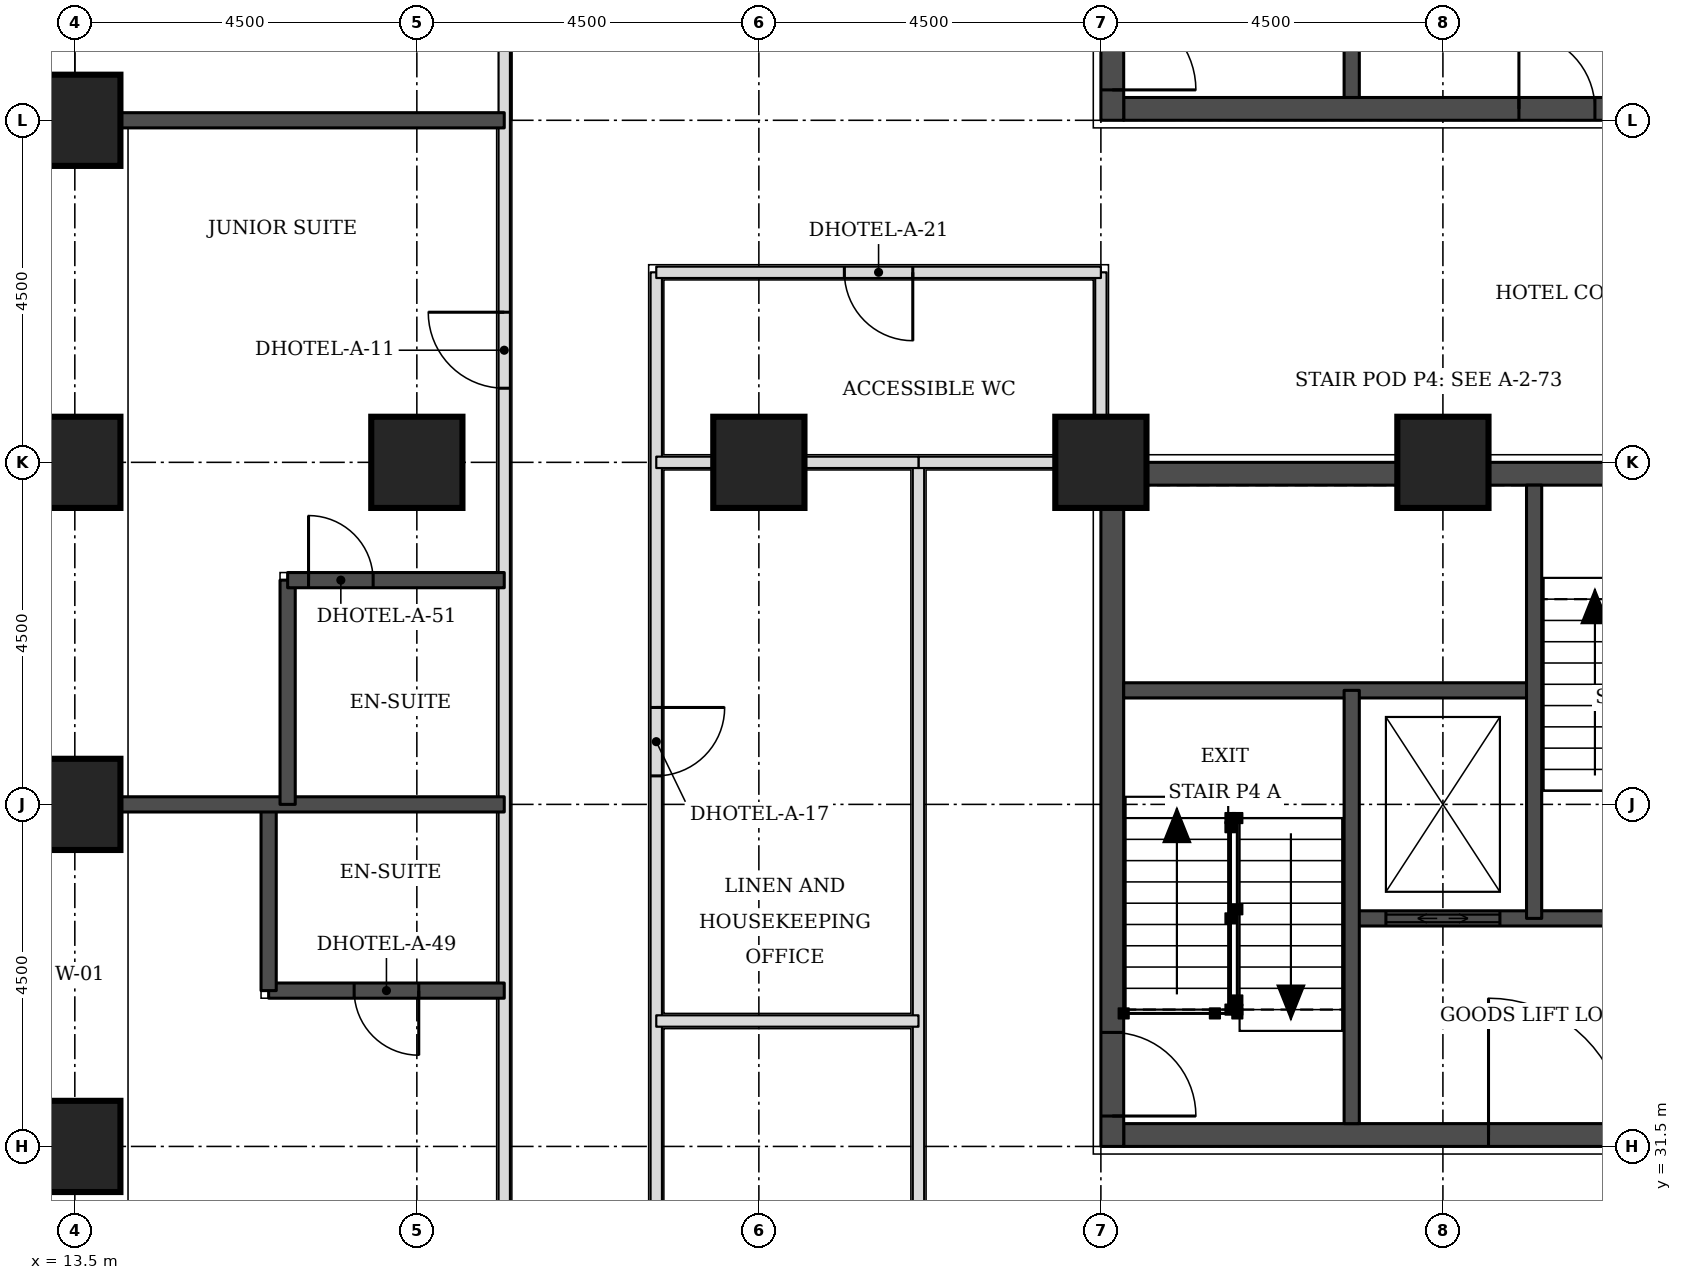
"""IFC4 building model, lengths in metres.
Left out: names, types, materials, properties, quantities, classifications, styles, units other than length and angle.
Written with IfcOpenShell. Run it as: python <this file> out.ifc"""

import sys

from ifc_helpers import new_model, si_unit, direction, frame, frame_2d, origin, origin_2d, place, context, subcontext, project, spatial, rectangle, extrude, element, fill, save


model = new_model("IFC4")
c1 = context("Model", 3, precision=1e-05, world=origin(), true_north=direction((0.0, 1.0)))
c2 = subcontext(c1, "Body", "Model", "MODEL_VIEW")
j1 = project(units=[si_unit("LENGTHUNIT", "METRE"), si_unit("PLANEANGLEUNIT", "RADIAN")], contexts=[c1])
p1 = place(None, origin())
s1 = spatial("IfcSite", under=j1, at=p1, CompositionType="ELEMENT")
p2 = place(p1, origin())
s2 = spatial("IfcBuilding", under=s1, at=p2, CompositionType="ELEMENT")
p3 = place(p2, frame((0.0, 0.0, 26.4)))
s3 = spatial("IfcBuildingStorey", under=s2, at=p3, CompositionType="ELEMENT", Elevation=26.4)
for number, where, z_axis, x_axis in (
    (1, (13.5, 31.5, 0.0), (0.0, 0.0, 1.0), (1.0, 0.0, 0.0)),
    (2, (13.5, 36.0, 0.0), (0.0, 0.0, 1.0), (1.0, 0.0, 0.0)),
    (3, (13.5, 40.5, 0.0), (0.0, 0.0, 1.0), (1.0, 0.0, 0.0)),
    (4, (18.0, 40.5, 0.0), (0.0, 0.0, 1.0), (1.0, 0.0, 0.0)),
    (5, (22.5, 40.5, 0.0), (0.0, 0.0, 1.0), (1.0, 0.0, 0.0)),
    (6, (27.0, 40.5, 0.0), (0.0, 0.0, 1.0), (1.0, 0.0, 0.0)),
    (7, (31.5, 40.5, 0.0), (0.0, 0.0, 1.0), (1.0, 0.0, 0.0)),
    (8, (13.5, 45.0, 0.0), (0.0, 0.0, 1.0), (1.0, 0.0, 0.0)),
):
    element("IfcColumn", number, at=place(p3, frame(where, z_axis=z_axis, x_axis=x_axis)), inside=s3, PredefinedType="COLUMN", context=c2, shape_type="SweptSolid", body=[
        extrude(rectangle(XDim=1.2, YDim=1.2, at=origin_2d()), origin(), (0.0, 0.0, 1.0), 3.3),
    ])
p4 = place(p3, frame((27.3, 45.15, 0.0), z_axis=(0.0, 0.0, 1.0), x_axis=(1.0, 0.0, 0.0)))
e9 = element("IfcWall", 9, at=p4, inside=s3, PredefinedType="SHEAR", context=c2, shape_type="SweptSolid", body=[
    extrude(rectangle(XDim=8.4, YDim=0.3, at=frame_2d((4.2, 0.0))), origin(), (0.0, 0.0, 1.0), 3.3),
])
p5 = place(p4, frame((5.2, 0.0, 0.0)))
e10 = element("IfcOpeningElement", 10, at=p5, cuts=e9, PredefinedType="OPENING", context=c2, shape_type="SweptSolid", body=[
    extrude(rectangle(XDim=1.0, YDim=2.1, at=frame_2d((0.5, 1.05))), frame((0.0, 0.16, 0.0), z_axis=(0.0, -1.0, 0.0), x_axis=(1.0, 0.0, 0.0)), (0.0, 0.0, 1.0), 0.32),
])
p6 = place(p3, frame((27.15, 45.0, 0.0), z_axis=(0.0, 0.0, 1.0), x_axis=(0.0, 1.0, 0.0)))
e11 = element("IfcWall", 11, at=p6, inside=s3, PredefinedType="SHEAR", context=c2, shape_type="SweptSolid", body=[
    extrude(rectangle(XDim=9.0, YDim=0.3, at=frame_2d((4.5, 0.0))), origin(), (0.0, 0.0, 1.0), 3.3),
])
p7 = place(p6, frame((0.4, 0.0, 0.0)))
e12 = element("IfcOpeningElement", 12, at=p7, cuts=e11, PredefinedType="OPENING", context=c2, shape_type="SweptSolid", body=[
    extrude(rectangle(XDim=1.1, YDim=2.1, at=frame_2d((0.55, 1.05))), frame((0.0, 0.16, 0.0), z_axis=(0.0, -1.0, 0.0), x_axis=(1.0, 0.0, 0.0)), (0.0, 0.0, 1.0), 0.32),
])
p8 = place(p3, frame((27.3, 31.65, 0.0), z_axis=(0.0, 0.0, 1.0), x_axis=(1.0, 0.0, 0.0)))
e13 = element("IfcWall", 13, at=p8, inside=s3, PredefinedType="SHEAR", context=c2, shape_type="SweptSolid", body=[
    extrude(rectangle(XDim=8.4, YDim=0.3, at=frame_2d((4.2, 0.0))), origin(), (0.0, 0.0, 1.0), 3.3),
])
p9 = place(p8, frame((4.8, 0.0, 0.0)))
e14 = element("IfcOpeningElement", 14, at=p9, cuts=e13, PredefinedType="OPENING", context=c2, shape_type="SweptSolid", body=[
    extrude(rectangle(XDim=1.8, YDim=2.1, at=frame_2d((0.9, 1.05))), frame((0.0, 0.16, 0.0), z_axis=(0.0, -1.0, 0.0), x_axis=(1.0, 0.0, 0.0)), (0.0, 0.0, 1.0), 0.32),
])
p10 = place(p3, frame((27.3, 40.35, 0.0), z_axis=(0.0, 0.0, 1.0), x_axis=(1.0, 0.0, 0.0)))
e15 = element("IfcWall", 15, at=p10, inside=s3, PredefinedType="SHEAR", context=c2, shape_type="SweptSolid", body=[
    extrude(rectangle(XDim=8.4, YDim=0.3, at=frame_2d((4.2, 0.0))), origin(), (0.0, 0.0, 1.0), 3.3),
])
p11 = place(p10, frame((6.4, 0.0, 0.0)))
e16 = element("IfcOpeningElement", 16, at=p11, cuts=e15, PredefinedType="OPENING", context=c2, shape_type="SweptSolid", body=[
    extrude(rectangle(XDim=1.1, YDim=2.1, at=frame_2d((0.55, 1.05))), frame((0.0, 0.16, 0.0), z_axis=(0.0, -1.0, 0.0), x_axis=(1.0, 0.0, 0.0)), (0.0, 0.0, 1.0), 0.32),
])
p12 = place(p3, frame((27.15, 31.5, 0.0), z_axis=(0.0, 0.0, 1.0), x_axis=(0.0, 1.0, 0.0)))
e17 = element("IfcWall", 17, at=p12, inside=s3, PredefinedType="SHEAR", context=c2, shape_type="SweptSolid", body=[
    extrude(rectangle(XDim=9.0, YDim=0.3, at=frame_2d((4.5, 0.0))), origin(), (0.0, 0.0, 1.0), 3.3),
])
p13 = place(p12, frame((0.4, 0.0, 0.0)))
e18 = element("IfcOpeningElement", 18, at=p13, cuts=e17, PredefinedType="OPENING", context=c2, shape_type="SweptSolid", body=[
    extrude(rectangle(XDim=1.1, YDim=2.1, at=frame_2d((0.55, 1.05))), frame((0.0, 0.16, 0.0), z_axis=(0.0, -1.0, 0.0), x_axis=(1.0, 0.0, 0.0)), (0.0, 0.0, 1.0), 0.32),
])
p14 = place(p3, frame((19.15, 23.65, 0.0), z_axis=(0.0, 0.0, 1.0), x_axis=(0.0, 1.0, 0.0)))
e19 = element("IfcWall", 19, at=p14, inside=s3, PredefinedType="PARTITIONING", context=c2, shape_type="SweptSolid", body=[
    extrude(rectangle(XDim=25.85, YDim=0.15, at=frame_2d((12.925, 0.0))), origin(), (0.0, 0.0, 1.0), 3.08),
])
p15 = place(p14, frame((1.775, 0.0, 0.0)))
e20 = element("IfcOpeningElement", 20, at=p15, cuts=e19, PredefinedType="OPENING", context=c2, shape_type="SweptSolid", body=[
    extrude(rectangle(XDim=1.0, YDim=2.1, at=frame_2d((0.5, 1.05))), frame((0.0, 0.085, 0.0), z_axis=(0.0, -1.0, 0.0), x_axis=(1.0, 0.0, 0.0)), (0.0, 0.0, 1.0), 0.17),
])
p16 = place(p14, frame((6.125, 0.0, 0.0)))
e21 = element("IfcOpeningElement", 21, at=p16, cuts=e19, PredefinedType="OPENING", context=c2, shape_type="SweptSolid", body=[
    extrude(rectangle(XDim=1.0, YDim=2.1, at=frame_2d((0.5, 1.05))), frame((0.0, 0.085, 0.0), z_axis=(0.0, -1.0, 0.0), x_axis=(1.0, 0.0, 0.0)), (0.0, 0.0, 1.0), 0.17),
])
p17 = place(p14, frame((17.825, 0.0, 0.0)))
e22 = element("IfcOpeningElement", 22, at=p17, cuts=e19, PredefinedType="OPENING", context=c2, shape_type="SweptSolid", body=[
    extrude(rectangle(XDim=1.0, YDim=2.1, at=frame_2d((0.5, 1.05))), frame((0.0, 0.085, 0.0), z_axis=(0.0, -1.0, 0.0), x_axis=(1.0, 0.0, 0.0)), (0.0, 0.0, 1.0), 0.17),
])
p18 = place(p14, frame((23.04, 0.0, 0.0)))
e23 = element("IfcOpeningElement", 23, at=p18, cuts=e19, PredefinedType="OPENING", context=c2, shape_type="SweptSolid", body=[
    extrude(rectangle(XDim=0.9, YDim=2.1, at=frame_2d((0.45, 1.05))), frame((0.0, 0.085, 0.0), z_axis=(0.0, -1.0, 0.0), x_axis=(1.0, 0.0, 0.0)), (0.0, 0.0, 1.0), 0.17),
])
p19 = place(p3, frame((21.15, 25.65, 0.0), z_axis=(0.0, 0.0, 1.0), x_axis=(0.0, 1.0, 0.0)))
e24 = element("IfcWall", 24, at=p19, inside=s3, PredefinedType="PARTITIONING", context=c2, shape_type="SweptSolid", body=[
    extrude(rectangle(XDim=17.35, YDim=0.15, at=frame_2d((8.675, 0.0))), origin(), (0.0, 0.0, 1.0), 3.08),
])
p20 = place(p19, frame((3.3, 0.0, 0.0)))
e25 = element("IfcOpeningElement", 25, at=p20, cuts=e24, PredefinedType="OPENING", context=c2, shape_type="SweptSolid", body=[
    extrude(rectangle(XDim=0.9, YDim=2.1, at=frame_2d((0.45, 1.05))), frame((0.0, 0.085, 0.0), z_axis=(0.0, -1.0, 0.0), x_axis=(1.0, 0.0, 0.0)), (0.0, 0.0, 1.0), 0.17),
])
p21 = place(p19, frame((10.725, 0.0, 0.0)))
e26 = element("IfcOpeningElement", 26, at=p21, cuts=e24, PredefinedType="OPENING", context=c2, shape_type="SweptSolid", body=[
    extrude(rectangle(XDim=0.9, YDim=2.1, at=frame_2d((0.45, 1.05))), frame((0.0, 0.085, 0.0), z_axis=(0.0, -1.0, 0.0), x_axis=(1.0, 0.0, 0.0)), (0.0, 0.0, 1.0), 0.17),
])
p22 = place(p3, frame((24.6, 25.65, 0.0), z_axis=(0.0, 0.0, 1.0), x_axis=(0.0, 1.0, 0.0)))
e27 = element("IfcWall", 27, at=p22, inside=s3, PredefinedType="PARTITIONING", context=c2, shape_type="SweptSolid", body=[
    extrude(rectangle(XDim=14.85, YDim=0.15, at=frame_2d((7.425, 0.0))), origin(), (0.0, 0.0, 1.0), 3.08),
])
p23 = place(p3, frame((24.6, 40.5, 0.0), z_axis=(0.0, 0.0, 1.0), x_axis=(1.0, 0.0, 0.0)))
e28 = element("IfcWall", 28, at=p23, inside=s3, PredefinedType="PARTITIONING", context=c2, shape_type="SweptSolid", body=[
    extrude(rectangle(XDim=2.35, YDim=0.15, at=frame_2d((1.175, 0.0))), origin(), (0.0, 0.0, 1.0), 2.33),
])
p24 = place(p3, frame((27.0, 40.55, 0.0), z_axis=(0.0, 0.0, 1.0), x_axis=(0.0, 1.0, 0.0)))
e29 = element("IfcWall", 29, at=p24, inside=s3, PredefinedType="PARTITIONING", context=c2, shape_type="SweptSolid", body=[
    extrude(rectangle(XDim=2.45, YDim=0.15, at=frame_2d((1.225, 0.0))), origin(), (0.0, 0.0, 1.0), 3.08),
])
p25 = place(p3, frame((21.15, 43.0, 0.0), z_axis=(0.0, 0.0, 1.0), x_axis=(1.0, 0.0, 0.0)))
e30 = element("IfcWall", 30, at=p25, inside=s3, PredefinedType="PARTITIONING", context=c2, shape_type="SweptSolid", body=[
    extrude(rectangle(XDim=5.85, YDim=0.15, at=frame_2d((2.925, 0.0))), origin(), (0.0, 0.0, 1.0), 3.08),
])
p26 = place(p25, frame((2.475, 0.0, 0.0)))
e31 = element("IfcOpeningElement", 31, at=p26, cuts=e30, PredefinedType="OPENING", context=c2, shape_type="SweptSolid", body=[
    extrude(rectangle(XDim=0.9, YDim=2.1, at=frame_2d((0.45, 1.05))), frame((0.0, 0.085, 0.0), z_axis=(0.0, -1.0, 0.0), x_axis=(1.0, 0.0, 0.0)), (0.0, 0.0, 1.0), 0.17),
])
p27 = place(p3, frame((16.05, 33.55, 0.0), z_axis=(0.0, 0.0, 1.0), x_axis=(1.0, 0.0, 0.0)))
e32 = element("IfcWall", 32, at=p27, inside=s3, PredefinedType="SOLIDWALL", context=c2, shape_type="SweptSolid", body=[
    extrude(rectangle(XDim=3.1, YDim=0.2, at=frame_2d((1.55, 0.0))), origin(), (0.0, 0.0, 1.0), 3.08),
])
p28 = place(p27, frame((1.125, 0.0, 0.0)))
e33 = element("IfcOpeningElement", 33, at=p28, cuts=e32, PredefinedType="OPENING", context=c2, shape_type="SweptSolid", body=[
    extrude(rectangle(XDim=0.85, YDim=2.1, at=frame_2d((0.425, 1.05))), frame((0.0, 0.11, 0.0), z_axis=(0.0, -1.0, 0.0), x_axis=(1.0, 0.0, 0.0)), (0.0, 0.0, 1.0), 0.22),
])
p29 = place(p3, frame((16.05, 33.55, 0.0), z_axis=(0.0, 0.0, 1.0), x_axis=(0.0, 1.0, 0.0)))
e34 = element("IfcWall", 34, at=p29, inside=s3, PredefinedType="SOLIDWALL", context=c2, shape_type="SweptSolid", body=[
    extrude(rectangle(XDim=2.45, YDim=0.2, at=frame_2d((1.225, 0.0))), origin(), (0.0, 0.0, 1.0), 3.08),
])
p30 = place(p3, frame((14.1, 36.0, 0.0), z_axis=(0.0, 0.0, 1.0), x_axis=(1.0, 0.0, 0.0)))
e35 = element("IfcWall", 35, at=p30, inside=s3, PredefinedType="SOLIDWALL", context=c2, shape_type="SweptSolid", body=[
    extrude(rectangle(XDim=5.05, YDim=0.2, at=frame_2d((2.525, 0.0))), origin(), (0.0, 0.0, 1.0), 3.08),
])
p31 = place(p3, frame((16.3, 36.0, 0.0), z_axis=(0.0, 0.0, 1.0), x_axis=(0.0, 1.0, 0.0)))
e36 = element("IfcWall", 36, at=p31, inside=s3, PredefinedType="SOLIDWALL", context=c2, shape_type="SweptSolid", body=[
    extrude(rectangle(XDim=2.95, YDim=0.2, at=frame_2d((1.475, 0.0))), origin(), (0.0, 0.0, 1.0), 3.08),
])
p32 = place(p3, frame((16.3, 38.95, 0.0), z_axis=(0.0, 0.0, 1.0), x_axis=(1.0, 0.0, 0.0)))
e37 = element("IfcWall", 37, at=p32, inside=s3, PredefinedType="SOLIDWALL", context=c2, shape_type="SweptSolid", body=[
    extrude(rectangle(XDim=2.85, YDim=0.2, at=frame_2d((1.425, 0.0))), origin(), (0.0, 0.0, 1.0), 3.08),
])
p33 = place(p32, frame((0.275, 0.0, 0.0)))
e38 = element("IfcOpeningElement", 38, at=p33, cuts=e37, PredefinedType="OPENING", context=c2, shape_type="SweptSolid", body=[
    extrude(rectangle(XDim=0.85, YDim=2.1, at=frame_2d((0.425, 1.05))), frame((0.0, 0.11, 0.0), z_axis=(0.0, -1.0, 0.0), x_axis=(1.0, 0.0, 0.0)), (0.0, 0.0, 1.0), 0.22),
])
p34 = place(p3, frame((14.1, 45.0, 0.0), z_axis=(0.0, 0.0, 1.0), x_axis=(1.0, 0.0, 0.0)))
e39 = element("IfcWall", 39, at=p34, inside=s3, PredefinedType="SOLIDWALL", context=c2, shape_type="SweptSolid", body=[
    extrude(rectangle(XDim=5.05, YDim=0.2, at=frame_2d((2.525, 0.0))), origin(), (0.0, 0.0, 1.0), 3.08),
])
p35 = place(p3, frame((21.15, 33.15, 0.0), z_axis=(0.0, 0.0, 1.0), x_axis=(1.0, 0.0, 0.0)))
e40 = element("IfcWall", 40, at=p35, inside=s3, PredefinedType="PARTITIONING", context=c2, shape_type="SweptSolid", body=[
    extrude(rectangle(XDim=3.45, YDim=0.15, at=frame_2d((1.725, 0.0))), origin(), (0.0, 0.0, 1.0), 3.08),
])
p36 = place(p3, frame((21.15, 40.5, 0.0), z_axis=(0.0, 0.0, 1.0), x_axis=(1.0, 0.0, 0.0)))
e41 = element("IfcWall", 41, at=p36, inside=s3, PredefinedType="PARTITIONING", context=c2, shape_type="SweptSolid", body=[
    extrude(rectangle(XDim=3.45, YDim=0.15, at=frame_2d((1.725, 0.0))), origin(), (0.0, 0.0, 1.0), 2.33),
])
p37 = place(p3, frame((30.3, 45.3, 0.0), z_axis=(0.0, 0.0, 1.0), x_axis=(0.0, 1.0, 0.0)))
e42 = element("IfcWall", 42, at=p37, inside=s3, PredefinedType="SOLIDWALL", context=c2, shape_type="SweptSolid", body=[
    extrude(rectangle(XDim=5.7, YDim=0.2, at=frame_2d((2.85, 0.0))), origin(), (0.0, 0.0, 1.0), 3.08),
])
p38 = place(p3, frame((30.3, 34.5, 0.0), z_axis=(0.0, 0.0, 1.0), x_axis=(1.0, 0.0, 0.0)))
e43 = element("IfcWall", 43, at=p38, inside=s3, PredefinedType="SOLIDWALL", context=c2, shape_type="SweptSolid", body=[
    extrude(rectangle(XDim=5.4, YDim=0.2, at=frame_2d((2.7, 0.0))), origin(), (0.0, 0.0, 1.0), 3.08),
])
p39 = place(p38, frame((0.45, 0.0, 0.0)))
e44 = element("IfcOpeningElement", 44, at=p39, cuts=e43, PredefinedType="OPENING", context=c2, shape_type="SweptSolid", body=[
    extrude(rectangle(XDim=1.5, YDim=2.1, at=frame_2d((0.75, 1.05))), frame((0.0, 0.11, 0.0), z_axis=(0.0, -1.0, 0.0), x_axis=(1.0, 0.0, 0.0)), (0.0, 0.0, 1.0), 0.22),
])
p40 = place(p3, frame((27.3, 37.5, 0.0), z_axis=(0.0, 0.0, 1.0), x_axis=(1.0, 0.0, 0.0)))
e45 = element("IfcWall", 45, at=p40, inside=s3, PredefinedType="SOLIDWALL", context=c2, shape_type="SweptSolid", body=[
    extrude(rectangle(XDim=5.4, YDim=0.2, at=frame_2d((2.7, 0.0))), origin(), (0.0, 0.0, 1.0), 3.08),
])
for number, where, z_axis, x_axis in (
    (46, (30.3, 31.8, 0.0), (0.0, 0.0, 1.0), (0.0, 1.0, 0.0)),
    (47, (32.7, 34.5, 0.0), (0.0, 0.0, 1.0), (0.0, 1.0, 0.0)),
):
    element("IfcWall", number, at=place(p3, frame(where, z_axis=z_axis, x_axis=x_axis)), inside=s3, PredefinedType="SOLIDWALL", context=c2, shape_type="SweptSolid", body=[
        extrude(rectangle(XDim=5.7, YDim=0.2, at=frame_2d((2.85, 0.0))), origin(), (0.0, 0.0, 1.0), 3.08),
    ])
p41 = place(p28, frame((0.85, 0.0, 0.0), z_axis=(0.0, 0.0, 1.0), x_axis=(-1.0, 0.0, 0.0)))
e48 = element("IfcDoor", 48, at=p41, inside=s3, OperationType="SINGLE_SWING_LEFT", PredefinedType="DOOR", context=c2, shape_type="SweptSolid", body=[
    extrude(rectangle(XDim=0.85, YDim=2.1, at=frame_2d((0.425, 1.05))), frame((0.0, 0.025, 0.0), z_axis=(0.0, -1.0, 0.0), x_axis=(1.0, 0.0, 0.0)), (0.0, 0.0, 1.0), 0.05),
])
fill(e33, e48)
p42 = place(p17, origin())
e49 = element("IfcDoor", 49, at=p42, inside=s3, OperationType="SINGLE_SWING_RIGHT", PredefinedType="DOOR", context=c2, shape_type="SweptSolid", body=[
    extrude(rectangle(XDim=1.0, YDim=2.1, at=frame_2d((0.5, 1.05))), frame((0.0, 0.025, 0.0), z_axis=(0.0, -1.0, 0.0), x_axis=(1.0, 0.0, 0.0)), (0.0, 0.0, 1.0), 0.05),
])
fill(e22, e49)
p43 = place(p33, origin())
e50 = element("IfcDoor", 50, at=p43, inside=s3, OperationType="SINGLE_SWING_LEFT", PredefinedType="DOOR", context=c2, shape_type="SweptSolid", body=[
    extrude(rectangle(XDim=0.85, YDim=2.1, at=frame_2d((0.425, 1.05))), frame((0.0, 0.025, 0.0), z_axis=(0.0, -1.0, 0.0), x_axis=(1.0, 0.0, 0.0)), (0.0, 0.0, 1.0), 0.05),
])
fill(e38, e50)
p44 = place(p21, frame((0.9, 0.0, 0.0), z_axis=(0.0, 0.0, 1.0), x_axis=(-1.0, 0.0, 0.0)))
e51 = element("IfcDoor", 51, at=p44, inside=s3, OperationType="SINGLE_SWING_LEFT", PredefinedType="DOOR", context=c2, shape_type="SweptSolid", body=[
    extrude(rectangle(XDim=0.9, YDim=2.1, at=frame_2d((0.45, 1.05))), frame((0.0, 0.025, 0.0), z_axis=(0.0, -1.0, 0.0), x_axis=(1.0, 0.0, 0.0)), (0.0, 0.0, 1.0), 0.05),
])
fill(e26, e51)
p45 = place(p26, frame((0.9, 0.0, 0.0), z_axis=(0.0, 0.0, 1.0), x_axis=(-1.0, 0.0, 0.0)))
e52 = element("IfcDoor", 52, at=p45, inside=s3, OperationType="SINGLE_SWING_LEFT", PredefinedType="DOOR", context=c2, shape_type="SweptSolid", body=[
    extrude(rectangle(XDim=0.9, YDim=2.1, at=frame_2d((0.45, 1.05))), frame((0.0, 0.025, 0.0), z_axis=(0.0, -1.0, 0.0), x_axis=(1.0, 0.0, 0.0)), (0.0, 0.0, 1.0), 0.05),
])
fill(e31, e52)
p46 = place(p7, frame((1.1, 0.0, 0.0), z_axis=(0.0, 0.0, 1.0), x_axis=(-1.0, 0.0, 0.0)))
e53 = element("IfcDoor", 53, at=p46, inside=s3, OperationType="SINGLE_SWING_RIGHT", PredefinedType="DOOR", context=c2, shape_type="SweptSolid", body=[
    extrude(rectangle(XDim=1.1, YDim=2.1, at=frame_2d((0.55, 1.05))), frame((0.0, 0.025, 0.0), z_axis=(0.0, -1.0, 0.0), x_axis=(1.0, 0.0, 0.0)), (0.0, 0.0, 1.0), 0.05),
])
fill(e12, e53)
p47 = place(p5, origin())
e54 = element("IfcDoor", 54, at=p47, inside=s3, OperationType="SINGLE_SWING_LEFT", PredefinedType="DOOR", context=c2, shape_type="SweptSolid", body=[
    extrude(rectangle(XDim=1.0, YDim=2.1, at=frame_2d((0.5, 1.05))), frame((0.0, 0.025, 0.0), z_axis=(0.0, -1.0, 0.0), x_axis=(1.0, 0.0, 0.0)), (0.0, 0.0, 1.0), 0.05),
])
fill(e10, e54)
p48 = place(p13, frame((1.1, 0.0, 0.0), z_axis=(0.0, 0.0, 1.0), x_axis=(-1.0, 0.0, 0.0)))
e55 = element("IfcDoor", 55, at=p48, inside=s3, OperationType="SINGLE_SWING_RIGHT", PredefinedType="DOOR", context=c2, shape_type="SweptSolid", body=[
    extrude(rectangle(XDim=1.1, YDim=2.1, at=frame_2d((0.55, 1.05))), frame((0.0, 0.025, 0.0), z_axis=(0.0, -1.0, 0.0), x_axis=(1.0, 0.0, 0.0)), (0.0, 0.0, 1.0), 0.05),
])
fill(e18, e55)
p49 = place(p39, origin())
e56 = element("IfcDoor", 56, at=p49, inside=s3, OperationType="DOUBLE_DOOR_SLIDING", PredefinedType="DOOR", context=c2, shape_type="SweptSolid", body=[
    extrude(rectangle(XDim=1.5, YDim=2.1, at=frame_2d((0.75, 1.05))), frame((0.0, 0.025, 0.0), z_axis=(0.0, -1.0, 0.0), x_axis=(1.0, 0.0, 0.0)), (0.0, 0.0, 1.0), 0.05),
])
fill(e44, e56)
p50 = place(p9, origin())
e57 = element("IfcDoor", 57, at=p50, inside=s3, OperationType="SINGLE_SWING_LEFT", PredefinedType="DOOR", context=c2, shape_type="SweptSolid", body=[
    extrude(rectangle(XDim=1.8, YDim=2.1, at=frame_2d((0.9, 1.05))), frame((0.0, 0.025, 0.0), z_axis=(0.0, -1.0, 0.0), x_axis=(1.0, 0.0, 0.0)), (0.0, 0.0, 1.0), 0.05),
])
fill(e14, e57)
save(model, sys.argv[1])
